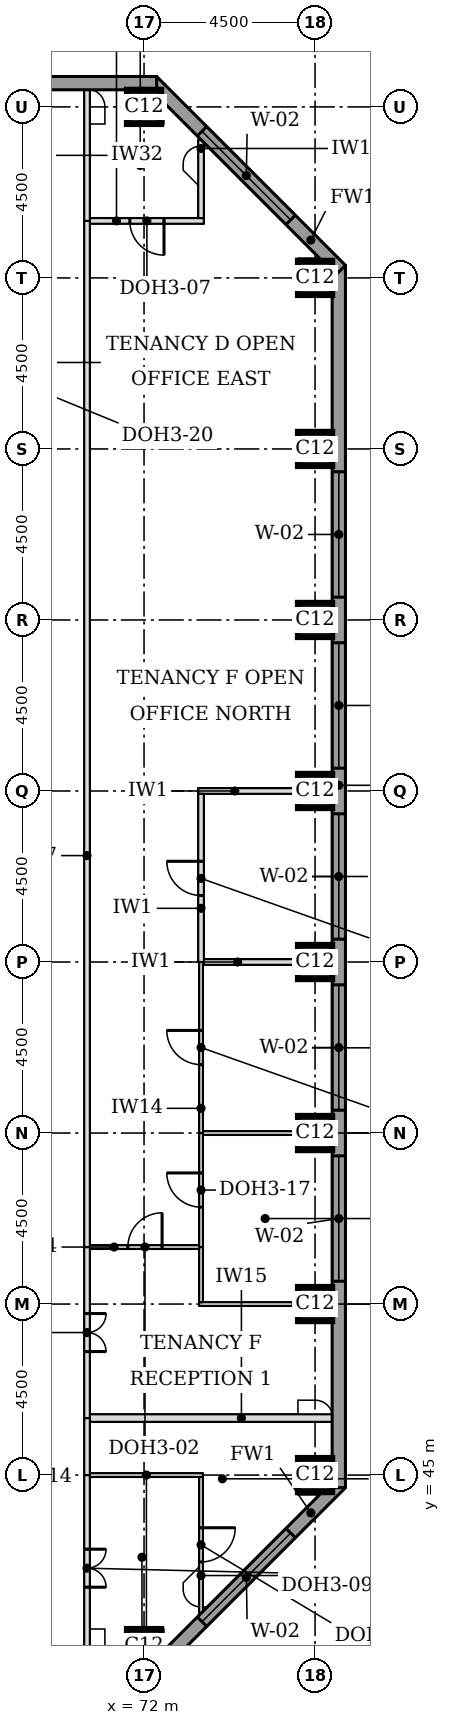
"""IFC4 building model, lengths in metres.
Left out: names, types, materials, properties, quantities, classifications, styles, units other than length and angle.
Written with IfcOpenShell. Run it as: python <this file> out.ifc"""

import sys

from ifc_helpers import new_model, si_unit, direction, frame, frame_2d, origin, origin_2d, place, context, subcontext, project, spatial, rectangle, extrude, element, fill, save


model = new_model("IFC4")
c1 = context("Model", 3, precision=1e-05, world=origin(), true_north=direction((0.0, 1.0)))
c2 = subcontext(c1, "Body", "Model", "MODEL_VIEW")
j1 = project(units=[si_unit("LENGTHUNIT", "METRE"), si_unit("PLANEANGLEUNIT", "RADIAN")], contexts=[c1])
p1 = place(None, origin())
s1 = spatial("IfcSite", under=j1, at=p1, CompositionType="ELEMENT")
p2 = place(p1, origin())
s2 = spatial("IfcBuilding", under=s1, at=p2, CompositionType="ELEMENT")
p3 = place(p2, frame((0.0, 0.0, 166.2)))
s3 = spatial("IfcBuildingStorey", under=s2, at=p3, CompositionType="ELEMENT", Elevation=166.2)
for number, where, z_axis, x_axis in (
    (1, (72.0, 40.5, 0.0), (0.0, 0.0, 1.0), (1.0, 0.0, 0.0)),
    (2, (76.5, 45.0, 0.0), (0.0, 0.0, 1.0), (1.0, 0.0, 0.0)),
    (3, (76.5, 49.5, 0.0), (0.0, 0.0, 1.0), (1.0, 0.0, 0.0)),
    (4, (76.5, 54.0, 0.0), (0.0, 0.0, 1.0), (1.0, 0.0, 0.0)),
    (5, (76.5, 58.5, 0.0), (0.0, 0.0, 1.0), (1.0, 0.0, 0.0)),
    (6, (76.5, 63.0, 0.0), (0.0, 0.0, 1.0), (1.0, 0.0, 0.0)),
    (7, (76.5, 67.5, 0.0), (0.0, 0.0, 1.0), (1.0, 0.0, 0.0)),
    (8, (76.5, 72.0, 0.0), (0.0, 0.0, 1.0), (1.0, 0.0, 0.0)),
    (9, (76.5, 76.5, 0.0), (0.0, 0.0, 1.0), (1.0, 0.0, 0.0)),
    (10, (72.0, 81.0, 0.0), (0.0, 0.0, 1.0), (1.0, 0.0, 0.0)),
):
    element("IfcColumn", number, at=place(p3, frame(where, z_axis=z_axis, x_axis=x_axis)), inside=s3, PredefinedType="COLUMN", context=c2, shape_type="SweptSolid", body=[
        extrude(rectangle(XDim=0.9, YDim=0.9, at=origin_2d()), origin(), (0.0, 0.0, 1.0), 3.7),
    ])
p4 = place(p3, frame((72.208, 39.824, 0.0), z_axis=(0.0, 0.0, 1.0), x_axis=(0.707106781187, 0.707106781187, 0.0)))
e11 = element("IfcWall", 11, at=p4, inside=s3, PredefinedType="STANDARD", context=c2, shape_type="SweptSolid", body=[
    extrude(rectangle(XDim=7.027, YDim=0.35, at=frame_2d((3.513, 0.0))), origin(), (0.0, 0.0, 1.0), 3.525),
])
p5 = place(p4, frame((1.863, 0.0, 0.9)))
e12 = element("IfcOpeningElement", 12, at=p5, cuts=e11, PredefinedType="OPENING", context=c2, shape_type="SweptSolid", body=[
    extrude(rectangle(XDim=3.3, YDim=1.9, at=frame_2d((1.65, 0.95))), frame((0.0, 0.185, 0.0), z_axis=(0.0, -1.0, 0.0), x_axis=(1.0, 0.0, 0.0)), (0.0, 0.0, 1.0), 0.37),
])
p6 = place(p3, frame((77.125, 44.669, 0.0), z_axis=(0.0, 0.0, 1.0), x_axis=(0.0, 1.0, 0.0)))
e13 = element("IfcWall", 13, at=p6, inside=s3, PredefinedType="STANDARD", context=c2, shape_type="SweptSolid", body=[
    extrude(rectangle(XDim=32.163, YDim=0.35, at=frame_2d((16.081, 0.0))), origin(), (0.0, 0.0, 1.0), 3.525),
])
p7 = place(p6, frame((5.431, 0.0, 0.9)))
e14 = element("IfcOpeningElement", 14, at=p7, cuts=e13, PredefinedType="OPENING", context=c2, shape_type="SweptSolid", body=[
    extrude(rectangle(XDim=3.3, YDim=1.9, at=frame_2d((1.65, 0.95))), frame((0.0, 0.185, 0.0), z_axis=(0.0, -1.0, 0.0), x_axis=(1.0, 0.0, 0.0)), (0.0, 0.0, 1.0), 0.37),
])
p8 = place(p6, frame((9.931, 0.0, 0.9)))
e15 = element("IfcOpeningElement", 15, at=p8, cuts=e13, PredefinedType="OPENING", context=c2, shape_type="SweptSolid", body=[
    extrude(rectangle(XDim=3.3, YDim=1.9, at=frame_2d((1.65, 0.95))), frame((0.0, 0.185, 0.0), z_axis=(0.0, -1.0, 0.0), x_axis=(1.0, 0.0, 0.0)), (0.0, 0.0, 1.0), 0.37),
])
p9 = place(p6, frame((14.431, 0.0, 0.9)))
e16 = element("IfcOpeningElement", 16, at=p9, cuts=e13, PredefinedType="OPENING", context=c2, shape_type="SweptSolid", body=[
    extrude(rectangle(XDim=3.3, YDim=1.9, at=frame_2d((1.65, 0.95))), frame((0.0, 0.185, 0.0), z_axis=(0.0, -1.0, 0.0), x_axis=(1.0, 0.0, 0.0)), (0.0, 0.0, 1.0), 0.37),
])
p10 = place(p6, frame((18.931, 0.0, 0.9)))
e17 = element("IfcOpeningElement", 17, at=p10, cuts=e13, PredefinedType="OPENING", context=c2, shape_type="SweptSolid", body=[
    extrude(rectangle(XDim=3.3, YDim=1.9, at=frame_2d((1.65, 0.95))), frame((0.0, 0.185, 0.0), z_axis=(0.0, -1.0, 0.0), x_axis=(1.0, 0.0, 0.0)), (0.0, 0.0, 1.0), 0.37),
])
p11 = place(p6, frame((23.431, 0.0, 0.9)))
e18 = element("IfcOpeningElement", 18, at=p11, cuts=e13, PredefinedType="OPENING", context=c2, shape_type="SweptSolid", body=[
    extrude(rectangle(XDim=3.3, YDim=1.9, at=frame_2d((1.65, 0.95))), frame((0.0, 0.185, 0.0), z_axis=(0.0, -1.0, 0.0), x_axis=(1.0, 0.0, 0.0)), (0.0, 0.0, 1.0), 0.37),
])
p12 = place(p3, frame((77.176, 76.708, 0.0), z_axis=(0.0, 0.0, 1.0), x_axis=(-0.707106781187, 0.707106781187, 0.0)))
e19 = element("IfcWall", 19, at=p12, inside=s3, PredefinedType="STANDARD", context=c2, shape_type="SweptSolid", body=[
    extrude(rectangle(XDim=7.027, YDim=0.35, at=frame_2d((3.513, 0.0))), origin(), (0.0, 0.0, 1.0), 3.525),
])
p13 = place(p12, frame((1.863, 0.0, 0.9)))
e20 = element("IfcOpeningElement", 20, at=p13, cuts=e19, PredefinedType="OPENING", context=c2, shape_type="SweptSolid", body=[
    extrude(rectangle(XDim=3.3, YDim=1.9, at=frame_2d((1.65, 0.95))), frame((0.0, 0.185, 0.0), z_axis=(0.0, -1.0, 0.0), x_axis=(1.0, 0.0, 0.0)), (0.0, 0.0, 1.0), 0.37),
])
p14 = place(p3, frame((72.331, 81.625, 0.0), z_axis=(0.0, 0.0, 1.0), x_axis=(-1.0, 0.0, 0.0)))
e21 = element("IfcWall", 21, at=p14, inside=s3, PredefinedType="STANDARD", context=c2, shape_type="SweptSolid", body=[
    extrude(rectangle(XDim=32.163, YDim=0.35, at=frame_2d((16.081, 0.0))), origin(), (0.0, 0.0, 1.0), 3.525),
])
p15 = place(p14, frame((5.431, 0.0, 0.9)))
e22 = element("IfcOpeningElement", 22, at=p15, cuts=e21, PredefinedType="OPENING", context=c2, shape_type="SweptSolid", body=[
    extrude(rectangle(XDim=3.3, YDim=1.9, at=frame_2d((1.65, 0.95))), frame((0.0, 0.185, 0.0), z_axis=(0.0, -1.0, 0.0), x_axis=(1.0, 0.0, 0.0)), (0.0, 0.0, 1.0), 0.37),
])
p16 = place(p14, frame((9.931, 0.0, 0.9)))
e23 = element("IfcOpeningElement", 23, at=p16, cuts=e21, PredefinedType="OPENING", context=c2, shape_type="SweptSolid", body=[
    extrude(rectangle(XDim=3.3, YDim=1.9, at=frame_2d((1.65, 0.95))), frame((0.0, 0.185, 0.0), z_axis=(0.0, -1.0, 0.0), x_axis=(1.0, 0.0, 0.0)), (0.0, 0.0, 1.0), 0.37),
])
p17 = place(p14, frame((14.431, 0.0, 0.9)))
e24 = element("IfcOpeningElement", 24, at=p17, cuts=e21, PredefinedType="OPENING", context=c2, shape_type="SweptSolid", body=[
    extrude(rectangle(XDim=3.3, YDim=1.9, at=frame_2d((1.65, 0.95))), frame((0.0, 0.185, 0.0), z_axis=(0.0, -1.0, 0.0), x_axis=(1.0, 0.0, 0.0)), (0.0, 0.0, 1.0), 0.37),
])
p18 = place(p14, frame((18.931, 0.0, 0.9)))
e25 = element("IfcOpeningElement", 25, at=p18, cuts=e21, PredefinedType="OPENING", context=c2, shape_type="SweptSolid", body=[
    extrude(rectangle(XDim=3.3, YDim=1.9, at=frame_2d((1.65, 0.95))), frame((0.0, 0.185, 0.0), z_axis=(0.0, -1.0, 0.0), x_axis=(1.0, 0.0, 0.0)), (0.0, 0.0, 1.0), 0.37),
])
p19 = place(p14, frame((23.431, 0.0, 0.9)))
e26 = element("IfcOpeningElement", 26, at=p19, cuts=e21, PredefinedType="OPENING", context=c2, shape_type="SweptSolid", body=[
    extrude(rectangle(XDim=3.3, YDim=1.9, at=frame_2d((1.65, 0.95))), frame((0.0, 0.185, 0.0), z_axis=(0.0, -1.0, 0.0), x_axis=(1.0, 0.0, 0.0)), (0.0, 0.0, 1.0), 0.37),
])
p20 = place(p3, frame((70.575, 45.0, 0.0), z_axis=(0.0, 0.0, 1.0), x_axis=(1.0, 0.0, 0.0)))
e27 = element("IfcWall", 27, at=p20, inside=s3, PredefinedType="PARTITIONING", context=c2, shape_type="SweptSolid", body=[
    extrude(rectangle(XDim=2.975, YDim=0.1, at=frame_2d((1.488, 0.0))), origin(), (0.0, 0.0, 1.0), 3.096),
])
p21 = place(p3, frame((70.575, 46.5, 0.0), z_axis=(0.0, 0.0, 1.0), x_axis=(1.0, 0.0, 0.0)))
e28 = element("IfcWall", 28, at=p21, inside=s3, PredefinedType="PARTITIONING", context=c2, shape_type="SweptSolid", body=[
    extrude(rectangle(XDim=6.375, YDim=0.2, at=frame_2d((3.188, 0.0))), origin(), (0.0, 0.0, 1.0), 3.55),
])
p22 = place(p3, frame((73.45, 49.5, 0.0), z_axis=(0.0, 0.0, 1.0), x_axis=(1.0, 0.0, 0.0)))
e29 = element("IfcWall", 29, at=p22, inside=s3, PredefinedType="PARTITIONING", context=c2, shape_type="SweptSolid", body=[
    extrude(rectangle(XDim=3.5, YDim=0.1, at=frame_2d((1.75, 0.0))), origin(), (0.0, 0.0, 1.0), 3.55),
])
p23 = place(p3, frame((70.575, 51.0, 0.0), z_axis=(0.0, 0.0, 1.0), x_axis=(1.0, 0.0, 0.0)))
e30 = element("IfcWall", 30, at=p23, inside=s3, PredefinedType="PARTITIONING", context=c2, shape_type="SweptSolid", body=[
    extrude(rectangle(XDim=2.875, YDim=0.1, at=frame_2d((1.438, 0.0))), origin(), (0.0, 0.0, 1.0), 3.55),
])
p24 = place(p23, frame((1.0, 0.0, 0.0)))
e31 = element("IfcOpeningElement", 31, at=p24, cuts=e30, PredefinedType="OPENING", context=c2, shape_type="SweptSolid", body=[
    extrude(rectangle(XDim=0.9, YDim=2.1, at=frame_2d((0.45, 1.05))), frame((0.0, 0.06, 0.0), z_axis=(0.0, -1.0, 0.0), x_axis=(1.0, 0.0, 0.0)), (0.0, 0.0, 1.0), 0.12),
])
p25 = place(p3, frame((73.55, 54.0, 0.0), z_axis=(0.0, 0.0, 1.0), x_axis=(1.0, 0.0, 0.0)))
e32 = element("IfcWall", 32, at=p25, inside=s3, PredefinedType="PARTITIONING", context=c2, shape_type="SweptSolid", body=[
    extrude(rectangle(XDim=3.4, YDim=0.1, at=frame_2d((1.7, 0.0))), origin(), (0.0, 0.0, 1.0), 3.55),
])
p26 = place(p3, frame((73.575, 58.5, 0.0), z_axis=(0.0, 0.0, 1.0), x_axis=(1.0, 0.0, 0.0)))
e33 = element("IfcWall", 33, at=p26, inside=s3, PredefinedType="PARTITIONING", context=c2, shape_type="SweptSolid", body=[
    extrude(rectangle(XDim=3.375, YDim=0.15, at=frame_2d((1.688, 0.0))), origin(), (0.0, 0.0, 1.0), 3.55),
])
p27 = place(p3, frame((73.425, 63.0, 0.0), z_axis=(0.0, 0.0, 1.0), x_axis=(1.0, 0.0, 0.0)))
e34 = element("IfcWall", 34, at=p27, inside=s3, PredefinedType="PARTITIONING", context=c2, shape_type="SweptSolid", body=[
    extrude(rectangle(XDim=3.525, YDim=0.15, at=frame_2d((1.762, 0.0))), origin(), (0.0, 0.0, 1.0), 3.55),
])
p28 = place(p3, frame((70.575, 78.0, 0.0), z_axis=(0.0, 0.0, 1.0), x_axis=(1.0, 0.0, 0.0)))
e35 = element("IfcWall", 35, at=p28, inside=s3, PredefinedType="PARTITIONING", context=c2, shape_type="SweptSolid", body=[
    extrude(rectangle(XDim=3.0, YDim=0.15, at=frame_2d((1.5, 0.0))), origin(), (0.0, 0.0, 1.0), 3.55),
])
p29 = place(p28, frame((1.05, 0.0, 0.0)))
e36 = element("IfcOpeningElement", 36, at=p29, cuts=e35, PredefinedType="OPENING", context=c2, shape_type="SweptSolid", body=[
    extrude(rectangle(XDim=0.9, YDim=2.1, at=frame_2d((0.45, 1.05))), frame((0.0, 0.085, 0.0), z_axis=(0.0, -1.0, 0.0), x_axis=(1.0, 0.0, 0.0)), (0.0, 0.0, 1.0), 0.17),
])
p30 = place(p3, frame((70.5, 40.05, 0.0), z_axis=(0.0, 0.0, 1.0), x_axis=(0.0, 1.0, 0.0)))
e37 = element("IfcWall", 37, at=p30, inside=s3, PredefinedType="PARTITIONING", context=c2, shape_type="SweptSolid", body=[
    extrude(rectangle(XDim=4.95, YDim=0.15, at=frame_2d((2.475, 0.0))), origin(), (0.0, 0.0, 1.0), 3.55),
])
p31 = place(p30, frame((2.0, 0.0, 0.0)))
e38 = element("IfcOpeningElement", 38, at=p31, cuts=e37, PredefinedType="OPENING", context=c2, shape_type="SweptSolid", body=[
    extrude(rectangle(XDim=1.0, YDim=2.1, at=frame_2d((0.5, 1.05))), frame((0.0, 0.085, 0.0), z_axis=(0.0, -1.0, 0.0), x_axis=(1.0, 0.0, 0.0)), (0.0, 0.0, 1.0), 0.17),
])
p32 = place(p3, frame((73.5, 41.364, 0.0), z_axis=(0.0, 0.0, 1.0), x_axis=(0.0, 1.0, 0.0)))
e39 = element("IfcWall", 39, at=p32, inside=s3, PredefinedType="PARTITIONING", context=c2, shape_type="SweptSolid", body=[
    extrude(rectangle(XDim=3.586, YDim=0.1, at=frame_2d((1.793, 0.0))), origin(), (0.0, 0.0, 1.0), 3.55),
])
p33 = place(p32, frame((1.35, 0.0, 0.0)))
e40 = element("IfcOpeningElement", 40, at=p33, cuts=e39, PredefinedType="OPENING", context=c2, shape_type="SweptSolid", body=[
    extrude(rectangle(XDim=0.9, YDim=2.1, at=frame_2d((0.45, 1.05))), frame((0.0, 0.06, 0.0), z_axis=(0.0, -1.0, 0.0), x_axis=(1.0, 0.0, 0.0)), (0.0, 0.0, 1.0), 0.12),
])
p34 = place(p3, frame((70.5, 45.0, 0.0), z_axis=(0.0, 0.0, 1.0), x_axis=(0.0, 1.0, 0.0)))
e41 = element("IfcWall", 41, at=p34, inside=s3, PredefinedType="PARTITIONING", context=c2, shape_type="SweptSolid", body=[
    extrude(rectangle(XDim=1.5, YDim=0.15, at=frame_2d((0.75, 0.0))), origin(), (0.0, 0.0, 1.0), 3.55),
])
p35 = place(p3, frame((70.5, 46.5, 0.0), z_axis=(0.0, 0.0, 1.0), x_axis=(0.0, 1.0, 0.0)))
e42 = element("IfcWall", 42, at=p35, inside=s3, PredefinedType="PARTITIONING", context=c2, shape_type="SweptSolid", body=[
    extrude(rectangle(XDim=4.5, YDim=0.15, at=frame_2d((2.25, 0.0))), origin(), (0.0, 0.0, 1.0), 3.55),
])
p36 = place(p35, frame((1.75, 0.0, 0.0)))
e43 = element("IfcOpeningElement", 43, at=p36, cuts=e42, PredefinedType="OPENING", context=c2, shape_type="SweptSolid", body=[
    extrude(rectangle(XDim=1.0, YDim=2.1, at=frame_2d((0.5, 1.05))), frame((0.0, 0.085, 0.0), z_axis=(0.0, -1.0, 0.0), x_axis=(1.0, 0.0, 0.0)), (0.0, 0.0, 1.0), 0.17),
])
p37 = place(p3, frame((73.5, 49.55, 0.0), z_axis=(0.0, 0.0, 1.0), x_axis=(0.0, 1.0, 0.0)))
e44 = element("IfcWall", 44, at=p37, inside=s3, PredefinedType="PARTITIONING", context=c2, shape_type="SweptSolid", body=[
    extrude(rectangle(XDim=1.45, YDim=0.1, at=frame_2d((0.725, 0.0))), origin(), (0.0, 0.0, 1.0), 3.55),
])
p38 = place(p3, frame((70.5, 51.0, 0.0), z_axis=(0.0, 0.0, 1.0), x_axis=(0.0, 1.0, 0.0)))
e45 = element("IfcWall", 45, at=p38, inside=s3, PredefinedType="PARTITIONING", context=c2, shape_type="SweptSolid", body=[
    extrude(rectangle(XDim=27.0, YDim=0.15, at=frame_2d((13.5, 0.0))), origin(), (0.0, 0.0, 1.0), 3.55),
])
p39 = place(p3, frame((73.5, 51.0, 0.0), z_axis=(0.0, 0.0, 1.0), x_axis=(0.0, 1.0, 0.0)))
e46 = element("IfcWall", 46, at=p39, inside=s3, PredefinedType="PARTITIONING", context=c2, shape_type="SweptSolid", body=[
    extrude(rectangle(XDim=3.0, YDim=0.1, at=frame_2d((1.5, 0.0))), origin(), (0.0, 0.0, 1.0), 3.55),
])
p40 = place(p39, frame((1.05, 0.0, 0.0)))
e47 = element("IfcOpeningElement", 47, at=p40, cuts=e46, PredefinedType="OPENING", context=c2, shape_type="SweptSolid", body=[
    extrude(rectangle(XDim=0.9, YDim=2.1, at=frame_2d((0.45, 1.05))), frame((0.0, 0.06, 0.0), z_axis=(0.0, -1.0, 0.0), x_axis=(1.0, 0.0, 0.0)), (0.0, 0.0, 1.0), 0.12),
])
p41 = place(p3, frame((73.5, 54.0, 0.0), z_axis=(0.0, 0.0, 1.0), x_axis=(0.0, 1.0, 0.0)))
e48 = element("IfcWall", 48, at=p41, inside=s3, PredefinedType="PARTITIONING", context=c2, shape_type="SweptSolid", body=[
    extrude(rectangle(XDim=4.5, YDim=0.1, at=frame_2d((2.25, 0.0))), origin(), (0.0, 0.0, 1.0), 3.55),
])
p42 = place(p41, frame((1.8, 0.0, 0.0)))
e49 = element("IfcOpeningElement", 49, at=p42, cuts=e48, PredefinedType="OPENING", context=c2, shape_type="SweptSolid", body=[
    extrude(rectangle(XDim=0.9, YDim=2.1, at=frame_2d((0.45, 1.05))), frame((0.0, 0.06, 0.0), z_axis=(0.0, -1.0, 0.0), x_axis=(1.0, 0.0, 0.0)), (0.0, 0.0, 1.0), 0.12),
])
p43 = place(p3, frame((73.5, 58.5, 0.0), z_axis=(0.0, 0.0, 1.0), x_axis=(0.0, 1.0, 0.0)))
e50 = element("IfcWall", 50, at=p43, inside=s3, PredefinedType="PARTITIONING", context=c2, shape_type="SweptSolid", body=[
    extrude(rectangle(XDim=4.425, YDim=0.15, at=frame_2d((2.212, 0.0))), origin(), (0.0, 0.0, 1.0), 3.55),
])
p44 = place(p43, frame((1.75, 0.0, 0.0)))
e51 = element("IfcOpeningElement", 51, at=p44, cuts=e50, PredefinedType="OPENING", context=c2, shape_type="SweptSolid", body=[
    extrude(rectangle(XDim=0.9, YDim=2.1, at=frame_2d((0.45, 1.05))), frame((0.0, 0.085, 0.0), z_axis=(0.0, -1.0, 0.0), x_axis=(1.0, 0.0, 0.0)), (0.0, 0.0, 1.0), 0.17),
])
p45 = place(p3, frame((70.5, 78.0, 0.0), z_axis=(0.0, 0.0, 1.0), x_axis=(0.0, 1.0, 0.0)))
e52 = element("IfcWall", 52, at=p45, inside=s3, PredefinedType="PARTITIONING", context=c2, shape_type="SweptSolid", body=[
    extrude(rectangle(XDim=3.45, YDim=0.15, at=frame_2d((1.725, 0.0))), origin(), (0.0, 0.0, 1.0), 3.55),
])
p46 = place(p3, frame((73.5, 78.075, 0.0), z_axis=(0.0, 0.0, 1.0), x_axis=(0.0, 1.0, 0.0)))
e53 = element("IfcWall", 53, at=p46, inside=s3, PredefinedType="PARTITIONING", context=c2, shape_type="SweptSolid", body=[
    extrude(rectangle(XDim=2.062, YDim=0.15, at=frame_2d((1.031, 0.0))), origin(), (0.0, 0.0, 1.0), 3.55),
])
p47 = place(p5, origin())
e54 = element("IfcWindow", 54, at=p47, inside=s3, PartitioningType="SINGLE_PANEL", PredefinedType="WINDOW", context=c2, shape_type="SweptSolid", body=[
    extrude(rectangle(XDim=3.3, YDim=1.9, at=frame_2d((1.65, 0.95))), frame((0.0, 0.085, 0.0), z_axis=(0.0, -1.0, 0.0), x_axis=(1.0, 0.0, 0.0)), (0.0, 0.0, 1.0), 0.06),
])
fill(e12, e54)
p48 = place(p7, origin())
e55 = element("IfcWindow", 55, at=p48, inside=s3, PartitioningType="SINGLE_PANEL", PredefinedType="WINDOW", context=c2, shape_type="SweptSolid", body=[
    extrude(rectangle(XDim=3.3, YDim=1.9, at=frame_2d((1.65, 0.95))), frame((0.0, 0.085, 0.0), z_axis=(0.0, -1.0, 0.0), x_axis=(1.0, 0.0, 0.0)), (0.0, 0.0, 1.0), 0.06),
])
fill(e14, e55)
p49 = place(p8, origin())
e56 = element("IfcWindow", 56, at=p49, inside=s3, PartitioningType="SINGLE_PANEL", PredefinedType="WINDOW", context=c2, shape_type="SweptSolid", body=[
    extrude(rectangle(XDim=3.3, YDim=1.9, at=frame_2d((1.65, 0.95))), frame((0.0, 0.085, 0.0), z_axis=(0.0, -1.0, 0.0), x_axis=(1.0, 0.0, 0.0)), (0.0, 0.0, 1.0), 0.06),
])
fill(e15, e56)
p50 = place(p9, origin())
e57 = element("IfcWindow", 57, at=p50, inside=s3, PartitioningType="SINGLE_PANEL", PredefinedType="WINDOW", context=c2, shape_type="SweptSolid", body=[
    extrude(rectangle(XDim=3.3, YDim=1.9, at=frame_2d((1.65, 0.95))), frame((0.0, 0.085, 0.0), z_axis=(0.0, -1.0, 0.0), x_axis=(1.0, 0.0, 0.0)), (0.0, 0.0, 1.0), 0.06),
])
fill(e16, e57)
p51 = place(p10, origin())
e58 = element("IfcWindow", 58, at=p51, inside=s3, PartitioningType="SINGLE_PANEL", PredefinedType="WINDOW", context=c2, shape_type="SweptSolid", body=[
    extrude(rectangle(XDim=3.3, YDim=1.9, at=frame_2d((1.65, 0.95))), frame((0.0, 0.085, 0.0), z_axis=(0.0, -1.0, 0.0), x_axis=(1.0, 0.0, 0.0)), (0.0, 0.0, 1.0), 0.06),
])
fill(e17, e58)
p52 = place(p11, origin())
e59 = element("IfcWindow", 59, at=p52, inside=s3, PartitioningType="SINGLE_PANEL", PredefinedType="WINDOW", context=c2, shape_type="SweptSolid", body=[
    extrude(rectangle(XDim=3.3, YDim=1.9, at=frame_2d((1.65, 0.95))), frame((0.0, 0.085, 0.0), z_axis=(0.0, -1.0, 0.0), x_axis=(1.0, 0.0, 0.0)), (0.0, 0.0, 1.0), 0.06),
])
fill(e18, e59)
p53 = place(p13, origin())
e60 = element("IfcWindow", 60, at=p53, inside=s3, PartitioningType="SINGLE_PANEL", PredefinedType="WINDOW", context=c2, shape_type="SweptSolid", body=[
    extrude(rectangle(XDim=3.3, YDim=1.9, at=frame_2d((1.65, 0.95))), frame((0.0, 0.085, 0.0), z_axis=(0.0, -1.0, 0.0), x_axis=(1.0, 0.0, 0.0)), (0.0, 0.0, 1.0), 0.06),
])
fill(e20, e60)
p54 = place(p31, frame((1.0, 0.0, 0.0), z_axis=(0.0, 0.0, 1.0), x_axis=(-1.0, 0.0, 0.0)))
e61 = element("IfcDoor", 61, at=p54, inside=s3, OperationType="DOUBLE_DOOR_SINGLE_SWING", PredefinedType="DOOR", context=c2, shape_type="SweptSolid", body=[
    extrude(rectangle(XDim=1.0, YDim=2.1, at=frame_2d((0.5, 1.05))), frame((0.0, 0.025, 0.0), z_axis=(0.0, -1.0, 0.0), x_axis=(1.0, 0.0, 0.0)), (0.0, 0.0, 1.0), 0.05),
])
fill(e38, e61)
p55 = place(p33, frame((0.9, 0.0, 0.0), z_axis=(0.0, 0.0, 1.0), x_axis=(-1.0, 0.0, 0.0)))
e62 = element("IfcDoor", 62, at=p55, inside=s3, OperationType="SINGLE_SWING_LEFT", PredefinedType="DOOR", context=c2, shape_type="SweptSolid", body=[
    extrude(rectangle(XDim=0.9, YDim=2.1, at=frame_2d((0.45, 1.05))), frame((0.0, 0.025, 0.0), z_axis=(0.0, -1.0, 0.0), x_axis=(1.0, 0.0, 0.0)), (0.0, 0.0, 1.0), 0.05),
])
fill(e40, e62)
p56 = place(p36, frame((1.0, 0.0, 0.0), z_axis=(0.0, 0.0, 1.0), x_axis=(-1.0, 0.0, 0.0)))
e63 = element("IfcDoor", 63, at=p56, inside=s3, OperationType="DOUBLE_DOOR_SINGLE_SWING", PredefinedType="DOOR", context=c2, shape_type="SweptSolid", body=[
    extrude(rectangle(XDim=1.0, YDim=2.1, at=frame_2d((0.5, 1.05))), frame((0.0, 0.025, 0.0), z_axis=(0.0, -1.0, 0.0), x_axis=(1.0, 0.0, 0.0)), (0.0, 0.0, 1.0), 0.05),
])
fill(e43, e63)
p57 = place(p24, origin())
e64 = element("IfcDoor", 64, at=p57, inside=s3, OperationType="SINGLE_SWING_RIGHT", PredefinedType="DOOR", context=c2, shape_type="SweptSolid", body=[
    extrude(rectangle(XDim=0.9, YDim=2.1, at=frame_2d((0.45, 1.05))), frame((0.0, 0.025, 0.0), z_axis=(0.0, -1.0, 0.0), x_axis=(1.0, 0.0, 0.0)), (0.0, 0.0, 1.0), 0.05),
])
fill(e31, e64)
p58 = place(p40, origin())
e65 = element("IfcDoor", 65, at=p58, inside=s3, OperationType="SINGLE_SWING_RIGHT", PredefinedType="DOOR", context=c2, shape_type="SweptSolid", body=[
    extrude(rectangle(XDim=0.9, YDim=2.1, at=frame_2d((0.45, 1.05))), frame((0.0, 0.025, 0.0), z_axis=(0.0, -1.0, 0.0), x_axis=(1.0, 0.0, 0.0)), (0.0, 0.0, 1.0), 0.05),
])
fill(e47, e65)
p59 = place(p42, origin())
e66 = element("IfcDoor", 66, at=p59, inside=s3, OperationType="SINGLE_SWING_RIGHT", PredefinedType="DOOR", context=c2, shape_type="SweptSolid", body=[
    extrude(rectangle(XDim=0.9, YDim=2.1, at=frame_2d((0.45, 1.05))), frame((0.0, 0.025, 0.0), z_axis=(0.0, -1.0, 0.0), x_axis=(1.0, 0.0, 0.0)), (0.0, 0.0, 1.0), 0.05),
])
fill(e49, e66)
p60 = place(p29, frame((0.9, 0.0, 0.0), z_axis=(0.0, 0.0, 1.0), x_axis=(-1.0, 0.0, 0.0)))
e67 = element("IfcDoor", 67, at=p60, inside=s3, OperationType="SINGLE_SWING_LEFT", PredefinedType="DOOR", context=c2, shape_type="SweptSolid", body=[
    extrude(rectangle(XDim=0.9, YDim=2.1, at=frame_2d((0.45, 1.05))), frame((0.0, 0.025, 0.0), z_axis=(0.0, -1.0, 0.0), x_axis=(1.0, 0.0, 0.0)), (0.0, 0.0, 1.0), 0.05),
])
fill(e36, e67)
p61 = place(p44, origin())
e68 = element("IfcDoor", 68, at=p61, inside=s3, OperationType="SINGLE_SWING_RIGHT", PredefinedType="DOOR", context=c2, shape_type="SweptSolid", body=[
    extrude(rectangle(XDim=0.9, YDim=2.1, at=frame_2d((0.45, 1.05))), frame((0.0, 0.025, 0.0), z_axis=(0.0, -1.0, 0.0), x_axis=(1.0, 0.0, 0.0)), (0.0, 0.0, 1.0), 0.05),
])
fill(e51, e68)
save(model, sys.argv[1])
